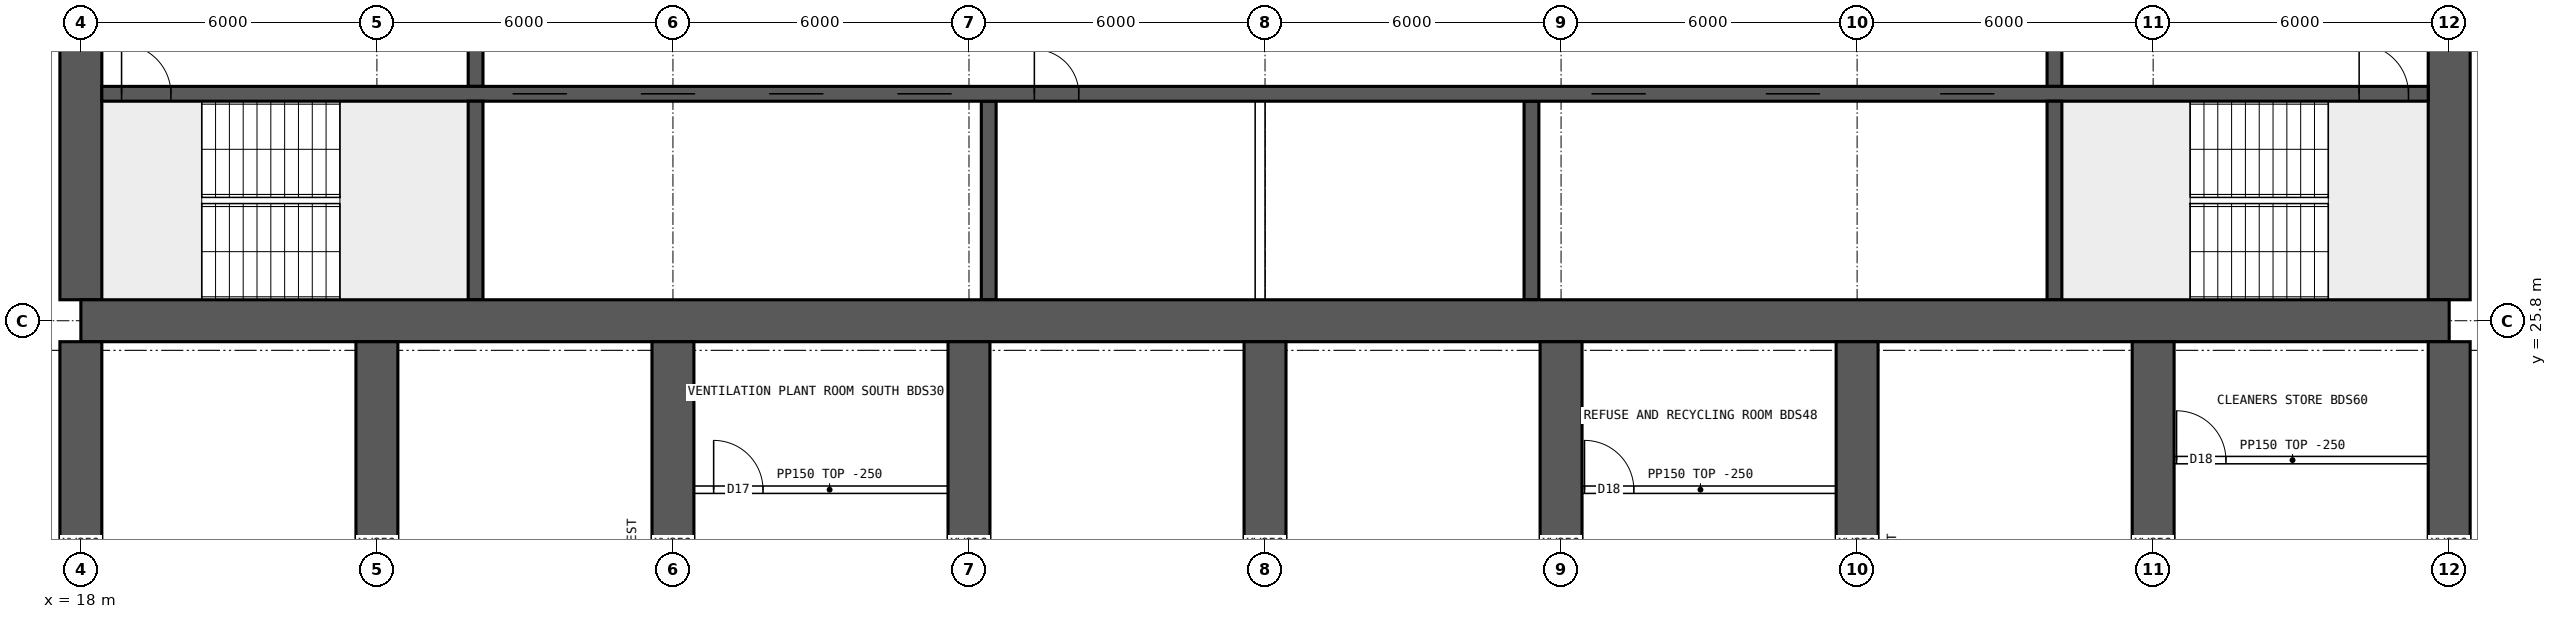
"""IFC4 building model, lengths in metres.
Left out: names, types, materials, properties, quantities, classifications, styles, units other than length and angle.
Written with IfcOpenShell. Run it as: python <this file> out.ifc"""

import sys

from ifc_helpers import new_model, si_unit, direction, frame, frame_2d, origin, place, context, subcontext, project, spatial, rectangle, extrude, element, fill, save


model = new_model("IFC4")
c1 = context("Model", 3, precision=1e-05, world=origin(), true_north=direction((0.0, 1.0)))
c2 = subcontext(c1, "Body", "Model", "MODEL_VIEW")
j1 = project(units=[si_unit("LENGTHUNIT", "METRE"), si_unit("PLANEANGLEUNIT", "RADIAN")], contexts=[c1])
p1 = place(None, origin())
s1 = spatial("IfcSite", under=j1, at=p1, CompositionType="ELEMENT")
p2 = place(p1, origin())
s2 = spatial("IfcBuilding", under=s1, at=p2, CompositionType="ELEMENT")
p3 = place(p2, frame((0.0, 0.0, 156.1)))
s3 = spatial("IfcBuildingStorey", under=s2, at=p3, CompositionType="ELEMENT", Elevation=156.1)
p4 = place(p3, frame((18.0, 25.8, 0.0), z_axis=(0.0, 0.0, 1.0), x_axis=(1.0, 0.0, 0.0)))
e1 = element("IfcWall", 1, at=p4, inside=s3, PredefinedType="SHEAR", context=c2, shape_type="SweptSolid", body=[
    extrude(rectangle(XDim=48.0, YDim=0.85, at=frame_2d((24.0, 0.0))), origin(), (0.0, 0.0, 1.0), 3.75),
])
p5 = place(p3, frame((18.0, 26.225, 0.0), z_axis=(0.0, 0.0, 1.0), x_axis=(0.0, 1.0, 0.0)))
e2 = element("IfcWall", 2, at=p5, inside=s3, PredefinedType="SHEAR", context=c2, shape_type="SweptSolid", body=[
    extrude(rectangle(XDim=11.55, YDim=0.85, at=frame_2d((5.775, 0.0))), origin(), (0.0, 0.0, 1.0), 3.75),
])
p6 = place(p5, frame((5.075, 0.0, 0.0)))
e3 = element("IfcOpeningElement", 3, at=p6, cuts=e2, PredefinedType="OPENING", context=c2, shape_type="SweptSolid", body=[
    extrude(rectangle(XDim=1.2, YDim=2.1, at=frame_2d((0.6, 1.05))), frame((0.0, 0.435, 0.0), z_axis=(0.0, -1.0, 0.0), x_axis=(1.0, 0.0, 0.0)), (0.0, 0.0, 1.0), 0.87),
])
p7 = place(p3, frame((66.0, 26.225, 0.0), z_axis=(0.0, 0.0, 1.0), x_axis=(0.0, 1.0, 0.0)))
e4 = element("IfcWall", 4, at=p7, inside=s3, PredefinedType="SHEAR", context=c2, shape_type="SweptSolid", body=[
    extrude(rectangle(XDim=11.55, YDim=0.85, at=frame_2d((5.775, 0.0))), origin(), (0.0, 0.0, 1.0), 3.75),
])
p8 = place(p7, frame((5.075, 0.0, 0.0)))
e5 = element("IfcOpeningElement", 5, at=p8, cuts=e4, PredefinedType="OPENING", context=c2, shape_type="SweptSolid", body=[
    extrude(rectangle(XDim=1.2, YDim=2.1, at=frame_2d((0.6, 1.05))), frame((0.0, 0.435, 0.0), z_axis=(0.0, -1.0, 0.0), x_axis=(1.0, 0.0, 0.0)), (0.0, 0.0, 1.0), 0.87),
])
p9 = place(p3, frame((18.425, 30.4, 0.0), z_axis=(0.0, 0.0, 1.0), x_axis=(1.0, 0.0, 0.0)))
e6 = element("IfcWall", 6, at=p9, inside=s3, PredefinedType="SHEAR", context=c2, shape_type="SweptSolid", body=[
    extrude(rectangle(XDim=47.15, YDim=0.3, at=frame_2d((23.575, 0.0))), origin(), (0.0, 0.0, 1.0), 3.75),
])
p10 = place(p9, frame((0.4, 0.0, 0.0)))
e7 = element("IfcOpeningElement", 7, at=p10, cuts=e6, PredefinedType="OPENING", context=c2, shape_type="SweptSolid", body=[
    extrude(rectangle(XDim=1.0, YDim=2.1, at=frame_2d((0.5, 1.05))), frame((0.0, 0.16, 0.0), z_axis=(0.0, -1.0, 0.0), x_axis=(1.0, 0.0, 0.0)), (0.0, 0.0, 1.0), 0.32),
])
p11 = place(p9, frame((45.75, 0.0, 0.0)))
e8 = element("IfcOpeningElement", 8, at=p11, cuts=e6, PredefinedType="OPENING", context=c2, shape_type="SweptSolid", body=[
    extrude(rectangle(XDim=1.0, YDim=2.1, at=frame_2d((0.5, 1.05))), frame((0.0, 0.16, 0.0), z_axis=(0.0, -1.0, 0.0), x_axis=(1.0, 0.0, 0.0)), (0.0, 0.0, 1.0), 0.32),
])
p12 = place(p9, frame((8.325, 0.0, 0.0)))
e9 = element("IfcOpeningElement", 9, at=p12, cuts=e6, PredefinedType="OPENING", context=c2, shape_type="SweptSolid", body=[
    extrude(rectangle(XDim=1.1, YDim=2.1, at=frame_2d((0.55, 1.05))), frame((0.0, 0.16, 0.0), z_axis=(0.0, -1.0, 0.0), x_axis=(1.0, 0.0, 0.0)), (0.0, 0.0, 1.0), 0.32),
])
p13 = place(p9, frame((10.925, 0.0, 0.0)))
e10 = element("IfcOpeningElement", 10, at=p13, cuts=e6, PredefinedType="OPENING", context=c2, shape_type="SweptSolid", body=[
    extrude(rectangle(XDim=1.1, YDim=2.1, at=frame_2d((0.55, 1.05))), frame((0.0, 0.16, 0.0), z_axis=(0.0, -1.0, 0.0), x_axis=(1.0, 0.0, 0.0)), (0.0, 0.0, 1.0), 0.32),
])
p14 = place(p9, frame((13.525, 0.0, 0.0)))
e11 = element("IfcOpeningElement", 11, at=p14, cuts=e6, PredefinedType="OPENING", context=c2, shape_type="SweptSolid", body=[
    extrude(rectangle(XDim=1.1, YDim=2.1, at=frame_2d((0.55, 1.05))), frame((0.0, 0.16, 0.0), z_axis=(0.0, -1.0, 0.0), x_axis=(1.0, 0.0, 0.0)), (0.0, 0.0, 1.0), 0.32),
])
p15 = place(p9, frame((16.125, 0.0, 0.0)))
e12 = element("IfcOpeningElement", 12, at=p15, cuts=e6, PredefinedType="OPENING", context=c2, shape_type="SweptSolid", body=[
    extrude(rectangle(XDim=1.1, YDim=2.1, at=frame_2d((0.55, 1.05))), frame((0.0, 0.16, 0.0), z_axis=(0.0, -1.0, 0.0), x_axis=(1.0, 0.0, 0.0)), (0.0, 0.0, 1.0), 0.32),
])
p16 = place(p9, frame((18.9, 0.0, 0.0)))
e13 = element("IfcOpeningElement", 13, at=p16, cuts=e6, PredefinedType="OPENING", context=c2, shape_type="SweptSolid", body=[
    extrude(rectangle(XDim=0.9, YDim=2.1, at=frame_2d((0.45, 1.05))), frame((0.0, 0.16, 0.0), z_axis=(0.0, -1.0, 0.0), x_axis=(1.0, 0.0, 0.0)), (0.0, 0.0, 1.0), 0.32),
])
p17 = place(p9, frame((30.192, 0.0, 0.0)))
e14 = element("IfcOpeningElement", 14, at=p17, cuts=e6, PredefinedType="OPENING", context=c2, shape_type="SweptSolid", body=[
    extrude(rectangle(XDim=1.1, YDim=2.1, at=frame_2d((0.55, 1.05))), frame((0.0, 0.16, 0.0), z_axis=(0.0, -1.0, 0.0), x_axis=(1.0, 0.0, 0.0)), (0.0, 0.0, 1.0), 0.32),
])
p18 = place(p9, frame((33.725, 0.0, 0.0)))
e15 = element("IfcOpeningElement", 15, at=p18, cuts=e6, PredefinedType="OPENING", context=c2, shape_type="SweptSolid", body=[
    extrude(rectangle(XDim=1.1, YDim=2.1, at=frame_2d((0.55, 1.05))), frame((0.0, 0.16, 0.0), z_axis=(0.0, -1.0, 0.0), x_axis=(1.0, 0.0, 0.0)), (0.0, 0.0, 1.0), 0.32),
])
p19 = place(p9, frame((37.258, 0.0, 0.0)))
e16 = element("IfcOpeningElement", 16, at=p19, cuts=e6, PredefinedType="OPENING", context=c2, shape_type="SweptSolid", body=[
    extrude(rectangle(XDim=1.1, YDim=2.1, at=frame_2d((0.55, 1.05))), frame((0.0, 0.16, 0.0), z_axis=(0.0, -1.0, 0.0), x_axis=(1.0, 0.0, 0.0)), (0.0, 0.0, 1.0), 0.32),
])
for number, where, z_axis, x_axis in (
    (17, (26.0, 26.225, 0.0), (0.0, 0.0, 1.0), (0.0, 1.0, 0.0)),
    (18, (58.0, 26.225, 0.0), (0.0, 0.0, 1.0), (0.0, 1.0, 0.0)),
):
    element("IfcWall", number, at=place(p3, frame(where, z_axis=z_axis, x_axis=x_axis)), inside=s3, PredefinedType="SHEAR", context=c2, shape_type="SweptSolid", body=[
        extrude(rectangle(XDim=4.025, YDim=0.3, at=frame_2d((2.012, 0.0))), origin(), (0.0, 0.0, 1.0), 3.75),
    ])
p20 = place(p3, frame((26.0, 30.55, 0.0), z_axis=(0.0, 0.0, 1.0), x_axis=(0.0, 1.0, 0.0)))
e19 = element("IfcWall", 19, at=p20, inside=s3, PredefinedType="SHEAR", context=c2, shape_type="SweptSolid", body=[
    extrude(rectangle(XDim=3.9, YDim=0.3, at=frame_2d((1.95, 0.0))), origin(), (0.0, 0.0, 1.0), 3.75),
])
p21 = place(p20, frame((1.4, 0.0, 0.0)))
e20 = element("IfcOpeningElement", 20, at=p21, cuts=e19, PredefinedType="OPENING", context=c2, shape_type="SweptSolid", body=[
    extrude(rectangle(XDim=1.2, YDim=2.1, at=frame_2d((0.6, 1.05))), frame((0.0, 0.16, 0.0), z_axis=(0.0, -1.0, 0.0), x_axis=(1.0, 0.0, 0.0)), (0.0, 0.0, 1.0), 0.32),
])
p22 = place(p3, frame((58.0, 30.55, 0.0), z_axis=(0.0, 0.0, 1.0), x_axis=(0.0, 1.0, 0.0)))
e21 = element("IfcWall", 21, at=p22, inside=s3, PredefinedType="SHEAR", context=c2, shape_type="SweptSolid", body=[
    extrude(rectangle(XDim=3.9, YDim=0.3, at=frame_2d((1.95, 0.0))), origin(), (0.0, 0.0, 1.0), 3.75),
])
p23 = place(p22, frame((1.4, 0.0, 0.0)))
e22 = element("IfcOpeningElement", 22, at=p23, cuts=e21, PredefinedType="OPENING", context=c2, shape_type="SweptSolid", body=[
    extrude(rectangle(XDim=1.2, YDim=2.1, at=frame_2d((0.6, 1.05))), frame((0.0, 0.16, 0.0), z_axis=(0.0, -1.0, 0.0), x_axis=(1.0, 0.0, 0.0)), (0.0, 0.0, 1.0), 0.32),
])
for number, where, z_axis, x_axis in (
    (23, (36.4, 26.225, 0.0), (0.0, 0.0, 1.0), (0.0, 1.0, 0.0)),
    (24, (47.4, 26.225, 0.0), (0.0, 0.0, 1.0), (0.0, 1.0, 0.0)),
):
    element("IfcWall", number, at=place(p3, frame(where, z_axis=z_axis, x_axis=x_axis)), inside=s3, PredefinedType="SHEAR", context=c2, shape_type="SweptSolid", body=[
        extrude(rectangle(XDim=4.025, YDim=0.3, at=frame_2d((2.012, 0.0))), origin(), (0.0, 0.0, 1.0), 3.75),
    ])
for number, where, z_axis, x_axis in (
    (25, (18.0, 17.2, 0.0), (0.0, 0.0, 1.0), (0.0, 1.0, 0.0)),
    (26, (24.0, 17.2, 0.0), (0.0, 0.0, 1.0), (0.0, 1.0, 0.0)),
    (27, (30.0, 17.2, 0.0), (0.0, 0.0, 1.0), (0.0, 1.0, 0.0)),
    (28, (36.0, 17.2, 0.0), (0.0, 0.0, 1.0), (0.0, 1.0, 0.0)),
    (29, (42.0, 17.2, 0.0), (0.0, 0.0, 1.0), (0.0, 1.0, 0.0)),
    (30, (48.0, 17.2, 0.0), (0.0, 0.0, 1.0), (0.0, 1.0, 0.0)),
    (31, (54.0, 17.2, 0.0), (0.0, 0.0, 1.0), (0.0, 1.0, 0.0)),
    (32, (60.0, 17.2, 0.0), (0.0, 0.0, 1.0), (0.0, 1.0, 0.0)),
    (33, (66.0, 17.2, 0.0), (0.0, 0.0, 1.0), (0.0, 1.0, 0.0)),
):
    element("IfcWall", number, at=place(p3, frame(where, z_axis=z_axis, x_axis=x_axis)), inside=s3, PredefinedType="SHEAR", context=c2, shape_type="SweptSolid", body=[
        extrude(rectangle(XDim=8.175, YDim=0.85, at=frame_2d((4.087, 0.0))), origin(), (0.0, 0.0, 1.0), 3.75),
    ])
p24 = place(p3, frame((41.9, 26.225, 0.0), z_axis=(0.0, 0.0, 1.0), x_axis=(0.0, 1.0, 0.0)))
e34 = element("IfcWall", 34, at=p24, inside=s3, PredefinedType="SOLIDWALL", context=c2, shape_type="SweptSolid", body=[
    extrude(rectangle(XDim=4.025, YDim=0.2, at=frame_2d((2.012, 0.0))), origin(), (0.0, 0.0, 1.0), 3.5),
])
p25 = place(p3, frame((30.425, 22.375, 0.0), z_axis=(0.0, 0.0, 1.0), x_axis=(1.0, 0.0, 0.0)))
e35 = element("IfcWall", 35, at=p25, inside=s3, PredefinedType="PARTITIONING", context=c2, shape_type="SweptSolid", body=[
    extrude(rectangle(XDim=5.5, YDim=0.15, at=frame_2d((2.75, 0.0))), origin(), (0.0, 0.0, 1.0), 3.5),
])
p26 = place(p25, frame((0.4, 0.0, 0.0)))
e36 = element("IfcOpeningElement", 36, at=p26, cuts=e35, PredefinedType="OPENING", context=c2, shape_type="SweptSolid", body=[
    extrude(rectangle(XDim=1.0, YDim=2.1, at=frame_2d((0.5, 1.05))), frame((0.0, 0.085, 0.0), z_axis=(0.0, -1.0, 0.0), x_axis=(1.0, 0.0, 0.0)), (0.0, 0.0, 1.0), 0.17),
])
p27 = place(p3, frame((48.075, 22.375, 0.0), z_axis=(0.0, 0.0, 1.0), x_axis=(1.0, 0.0, 0.0)))
e37 = element("IfcWall", 37, at=p27, inside=s3, PredefinedType="PARTITIONING", context=c2, shape_type="SweptSolid", body=[
    extrude(rectangle(XDim=5.5, YDim=0.15, at=frame_2d((2.75, 0.0))), origin(), (0.0, 0.0, 1.0), 3.5),
])
p28 = place(p27, frame((0.4, 0.0, 0.0)))
e38 = element("IfcOpeningElement", 38, at=p28, cuts=e37, PredefinedType="OPENING", context=c2, shape_type="SweptSolid", body=[
    extrude(rectangle(XDim=1.0, YDim=2.1, at=frame_2d((0.5, 1.05))), frame((0.0, 0.085, 0.0), z_axis=(0.0, -1.0, 0.0), x_axis=(1.0, 0.0, 0.0)), (0.0, 0.0, 1.0), 0.17),
])
p29 = place(p3, frame((60.075, 22.975, 0.0), z_axis=(0.0, 0.0, 1.0), x_axis=(1.0, 0.0, 0.0)))
e39 = element("IfcWall", 39, at=p29, inside=s3, PredefinedType="PARTITIONING", context=c2, shape_type="SweptSolid", body=[
    extrude(rectangle(XDim=5.5, YDim=0.15, at=frame_2d((2.75, 0.0))), origin(), (0.0, 0.0, 1.0), 3.5),
])
p30 = place(p29, frame((0.4, 0.0, 0.0)))
e40 = element("IfcOpeningElement", 40, at=p30, cuts=e39, PredefinedType="OPENING", context=c2, shape_type="SweptSolid", body=[
    extrude(rectangle(XDim=1.0, YDim=2.1, at=frame_2d((0.5, 1.05))), frame((0.0, 0.085, 0.0), z_axis=(0.0, -1.0, 0.0), x_axis=(1.0, 0.0, 0.0)), (0.0, 0.0, 1.0), 0.17),
])
p31 = place(p10, origin())
e41 = element("IfcDoor", 41, at=p31, inside=s3, OperationType="SINGLE_SWING_LEFT", PredefinedType="DOOR", context=c2, shape_type="SweptSolid", body=[
    extrude(rectangle(XDim=1.0, YDim=2.1, at=frame_2d((0.5, 1.05))), frame((0.0, 0.025, 0.0), z_axis=(0.0, -1.0, 0.0), x_axis=(1.0, 0.0, 0.0)), (0.0, 0.0, 1.0), 0.05),
])
fill(e7, e41)
p32 = place(p11, origin())
e42 = element("IfcDoor", 42, at=p32, inside=s3, OperationType="SINGLE_SWING_LEFT", PredefinedType="DOOR", context=c2, shape_type="SweptSolid", body=[
    extrude(rectangle(XDim=1.0, YDim=2.1, at=frame_2d((0.5, 1.05))), frame((0.0, 0.025, 0.0), z_axis=(0.0, -1.0, 0.0), x_axis=(1.0, 0.0, 0.0)), (0.0, 0.0, 1.0), 0.05),
])
fill(e8, e42)
p33 = place(p12, origin())
e43 = element("IfcDoor", 43, at=p33, inside=s3, OperationType="DOUBLE_DOOR_SLIDING", PredefinedType="DOOR", context=c2, shape_type="SweptSolid", body=[
    extrude(rectangle(XDim=1.1, YDim=2.1, at=frame_2d((0.55, 1.05))), frame((0.0, 0.025, 0.0), z_axis=(0.0, -1.0, 0.0), x_axis=(1.0, 0.0, 0.0)), (0.0, 0.0, 1.0), 0.05),
])
fill(e9, e43)
p34 = place(p13, origin())
e44 = element("IfcDoor", 44, at=p34, inside=s3, OperationType="DOUBLE_DOOR_SLIDING", PredefinedType="DOOR", context=c2, shape_type="SweptSolid", body=[
    extrude(rectangle(XDim=1.1, YDim=2.1, at=frame_2d((0.55, 1.05))), frame((0.0, 0.025, 0.0), z_axis=(0.0, -1.0, 0.0), x_axis=(1.0, 0.0, 0.0)), (0.0, 0.0, 1.0), 0.05),
])
fill(e10, e44)
p35 = place(p14, origin())
e45 = element("IfcDoor", 45, at=p35, inside=s3, OperationType="DOUBLE_DOOR_SLIDING", PredefinedType="DOOR", context=c2, shape_type="SweptSolid", body=[
    extrude(rectangle(XDim=1.1, YDim=2.1, at=frame_2d((0.55, 1.05))), frame((0.0, 0.025, 0.0), z_axis=(0.0, -1.0, 0.0), x_axis=(1.0, 0.0, 0.0)), (0.0, 0.0, 1.0), 0.05),
])
fill(e11, e45)
p36 = place(p15, origin())
e46 = element("IfcDoor", 46, at=p36, inside=s3, OperationType="DOUBLE_DOOR_SLIDING", PredefinedType="DOOR", context=c2, shape_type="SweptSolid", body=[
    extrude(rectangle(XDim=1.1, YDim=2.1, at=frame_2d((0.55, 1.05))), frame((0.0, 0.025, 0.0), z_axis=(0.0, -1.0, 0.0), x_axis=(1.0, 0.0, 0.0)), (0.0, 0.0, 1.0), 0.05),
])
fill(e12, e46)
p37 = place(p16, origin())
e47 = element("IfcDoor", 47, at=p37, inside=s3, OperationType="SINGLE_SWING_LEFT", PredefinedType="DOOR", context=c2, shape_type="SweptSolid", body=[
    extrude(rectangle(XDim=0.9, YDim=2.1, at=frame_2d((0.45, 1.05))), frame((0.0, 0.025, 0.0), z_axis=(0.0, -1.0, 0.0), x_axis=(1.0, 0.0, 0.0)), (0.0, 0.0, 1.0), 0.05),
])
fill(e13, e47)
p38 = place(p17, origin())
e48 = element("IfcDoor", 48, at=p38, inside=s3, OperationType="DOUBLE_DOOR_SLIDING", PredefinedType="DOOR", context=c2, shape_type="SweptSolid", body=[
    extrude(rectangle(XDim=1.1, YDim=2.1, at=frame_2d((0.55, 1.05))), frame((0.0, 0.025, 0.0), z_axis=(0.0, -1.0, 0.0), x_axis=(1.0, 0.0, 0.0)), (0.0, 0.0, 1.0), 0.05),
])
fill(e14, e48)
p39 = place(p18, origin())
e49 = element("IfcDoor", 49, at=p39, inside=s3, OperationType="DOUBLE_DOOR_SLIDING", PredefinedType="DOOR", context=c2, shape_type="SweptSolid", body=[
    extrude(rectangle(XDim=1.1, YDim=2.1, at=frame_2d((0.55, 1.05))), frame((0.0, 0.025, 0.0), z_axis=(0.0, -1.0, 0.0), x_axis=(1.0, 0.0, 0.0)), (0.0, 0.0, 1.0), 0.05),
])
fill(e15, e49)
p40 = place(p19, origin())
e50 = element("IfcDoor", 50, at=p40, inside=s3, OperationType="DOUBLE_DOOR_SLIDING", PredefinedType="DOOR", context=c2, shape_type="SweptSolid", body=[
    extrude(rectangle(XDim=1.1, YDim=2.1, at=frame_2d((0.55, 1.05))), frame((0.0, 0.025, 0.0), z_axis=(0.0, -1.0, 0.0), x_axis=(1.0, 0.0, 0.0)), (0.0, 0.0, 1.0), 0.05),
])
fill(e16, e50)
p41 = place(p26, origin())
e51 = element("IfcDoor", 51, at=p41, inside=s3, OperationType="SINGLE_SWING_LEFT", PredefinedType="DOOR", context=c2, shape_type="SweptSolid", body=[
    extrude(rectangle(XDim=1.0, YDim=2.1, at=frame_2d((0.5, 1.05))), frame((0.0, 0.025, 0.0), z_axis=(0.0, -1.0, 0.0), x_axis=(1.0, 0.0, 0.0)), (0.0, 0.0, 1.0), 0.05),
])
fill(e36, e51)
p42 = place(p28, origin())
e52 = element("IfcDoor", 52, at=p42, inside=s3, OperationType="SINGLE_SWING_LEFT", PredefinedType="DOOR", context=c2, shape_type="SweptSolid", body=[
    extrude(rectangle(XDim=1.0, YDim=2.1, at=frame_2d((0.5, 1.05))), frame((0.0, 0.025, 0.0), z_axis=(0.0, -1.0, 0.0), x_axis=(1.0, 0.0, 0.0)), (0.0, 0.0, 1.0), 0.05),
])
fill(e38, e52)
p43 = place(p30, origin())
e53 = element("IfcDoor", 53, at=p43, inside=s3, OperationType="SINGLE_SWING_LEFT", PredefinedType="DOOR", context=c2, shape_type="SweptSolid", body=[
    extrude(rectangle(XDim=1.0, YDim=2.1, at=frame_2d((0.5, 1.05))), frame((0.0, 0.025, 0.0), z_axis=(0.0, -1.0, 0.0), x_axis=(1.0, 0.0, 0.0)), (0.0, 0.0, 1.0), 0.05),
])
fill(e40, e53)
save(model, sys.argv[1])
